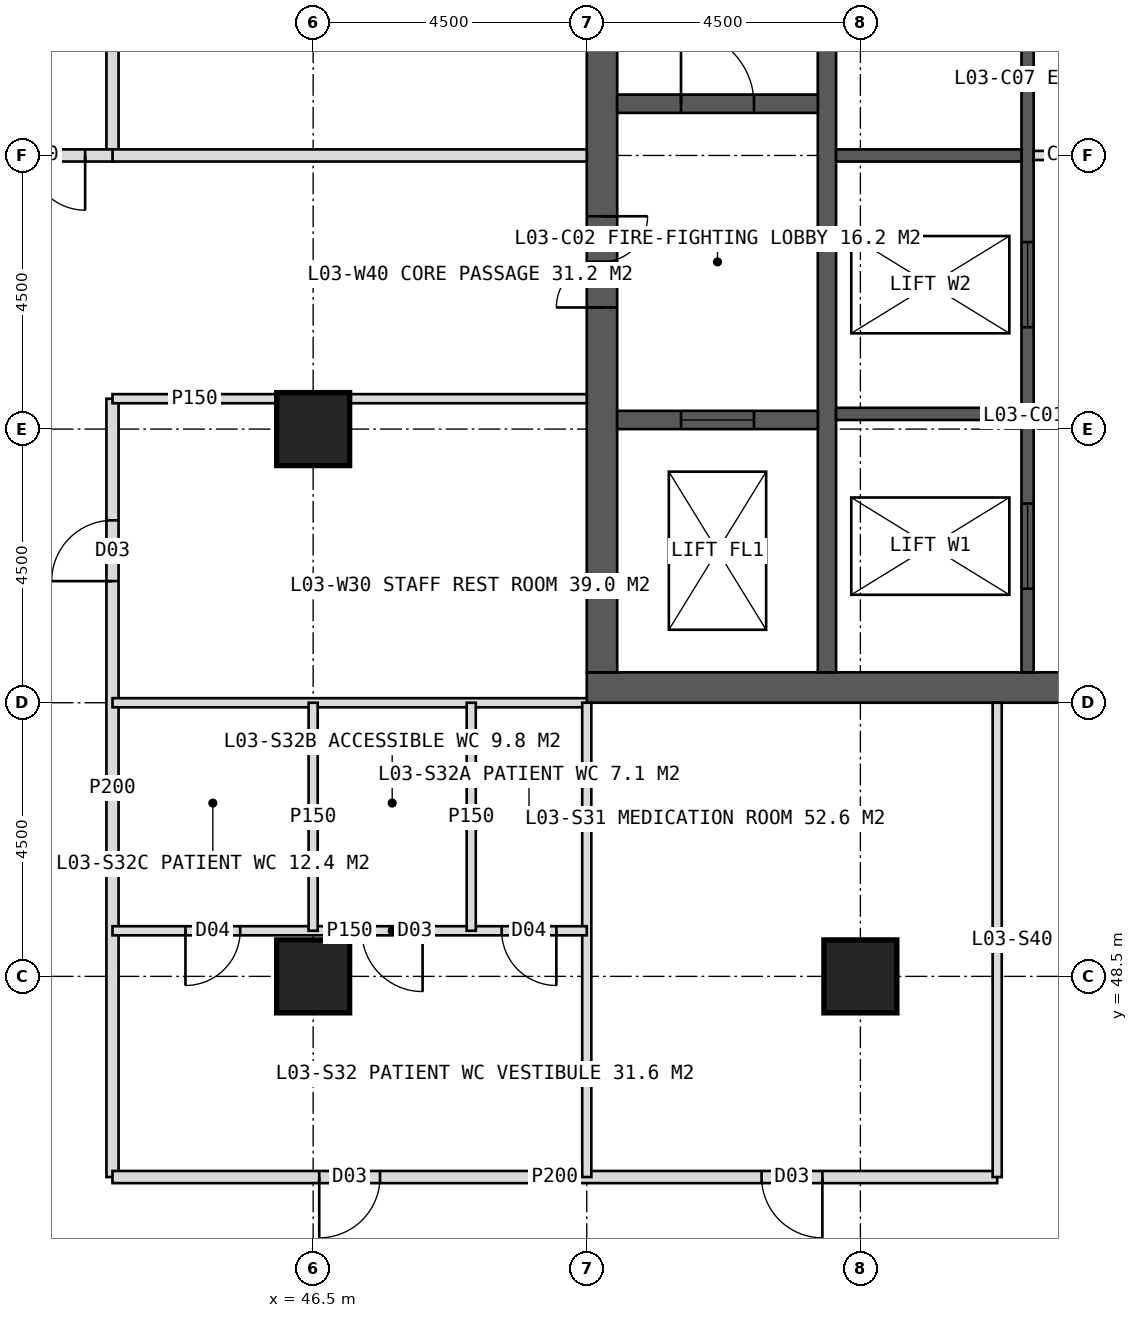
"""IFC4 building model, lengths in metres.
Left out: names, types, materials, properties, quantities, classifications, styles, units other than length and angle.
Written with IfcOpenShell. Run it as: python <this file> out.ifc"""

import sys

from ifc_helpers import new_model, si_unit, direction, frame, frame_2d, origin, origin_2d, place, context, subcontext, project, spatial, rectangle, hollow_rectangle, extrude, element, fill, save


model = new_model("IFC4")
c1 = context("Model", 3, precision=1e-05, world=origin(), true_north=direction((0.0, 1.0)))
c2 = subcontext(c1, "Body", "Model", "MODEL_VIEW")
j1 = project(units=[si_unit("LENGTHUNIT", "METRE"), si_unit("PLANEANGLEUNIT", "RADIAN")], contexts=[c1])
p1 = place(None, origin())
s1 = spatial("IfcSite", under=j1, at=p1, CompositionType="ELEMENT")
p2 = place(p1, origin())
s2 = spatial("IfcBuilding", under=s1, at=p2, CompositionType="ELEMENT")
p3 = place(p2, frame((0.0, 0.0, 16.5)))
s3 = spatial("IfcBuildingStorey", under=s2, at=p3, CompositionType="ELEMENT", Elevation=16.5)
p4 = place(p3, frame((51.0, 53.25, 0.0), z_axis=(0.0, 0.0, 1.0), x_axis=(1.0, 0.0, 0.0)))
e1 = element("IfcWall", 1, at=p4, inside=s3, PredefinedType="SHEAR", context=c2, shape_type="SweptSolid", body=[
    extrude(rectangle(XDim=18.0, YDim=0.5, at=frame_2d((9.0, 0.0))), origin(), (0.0, 0.0, 1.0), 4.5),
])
p5 = place(p4, frame((8.1, 0.0, 0.0)))
e2 = element("IfcOpeningElement", 2, at=p5, cuts=e1, PredefinedType="OPENING", context=c2, shape_type="SweptSolid", body=[
    extrude(rectangle(XDim=1.8, YDim=2.2, at=frame_2d((0.9, 1.1))), frame((0.0, 0.26, 0.0), z_axis=(0.0, -1.0, 0.0), x_axis=(1.0, 0.0, 0.0)), (0.0, 0.0, 1.0), 0.52),
])
p6 = place(p3, frame((51.25, 53.5, 0.0), z_axis=(0.0, 0.0, 1.0), x_axis=(0.0, 1.0, 0.0)))
e3 = element("IfcWall", 3, at=p6, inside=s3, PredefinedType="SHEAR", context=c2, shape_type="SweptSolid", body=[
    extrude(rectangle(XDim=17.0, YDim=0.5, at=frame_2d((8.5, 0.0))), origin(), (0.0, 0.0, 1.0), 4.5),
])
p7 = place(p6, frame((6.0, 0.0, 0.0)))
e4 = element("IfcOpeningElement", 4, at=p7, cuts=e3, PredefinedType="OPENING", context=c2, shape_type="SweptSolid", body=[
    extrude(rectangle(XDim=1.5, YDim=2.2, at=frame_2d((0.75, 1.1))), frame((0.0, 0.26, 0.0), z_axis=(0.0, -1.0, 0.0), x_axis=(1.0, 0.0, 0.0)), (0.0, 0.0, 1.0), 0.52),
])
p8 = place(p3, frame((54.95, 53.5, 0.0), z_axis=(0.0, 0.0, 1.0), x_axis=(0.0, 1.0, 0.0)))
e5 = element("IfcWall", 5, at=p8, inside=s3, PredefinedType="SHEAR", context=c2, shape_type="SweptSolid", body=[
    extrude(rectangle(XDim=17.0, YDim=0.3, at=frame_2d((8.5, 0.0))), origin(), (0.0, 0.0, 1.0), 4.5),
])
p9 = place(p3, frame((58.25, 53.5, 0.0), z_axis=(0.0, 0.0, 1.0), x_axis=(0.0, 1.0, 0.0)))
e6 = element("IfcWall", 6, at=p9, inside=s3, PredefinedType="SHEAR", context=c2, shape_type="SweptSolid", body=[
    extrude(rectangle(XDim=17.0, YDim=0.2, at=frame_2d((8.5, 0.0))), origin(), (0.0, 0.0, 1.0), 4.5),
])
p10 = place(p9, frame((1.375, 0.0, 0.0)))
e7 = element("IfcOpeningElement", 7, at=p10, cuts=e6, PredefinedType="OPENING", context=c2, shape_type="SweptSolid", body=[
    extrude(rectangle(XDim=1.4, YDim=2.2, at=frame_2d((0.7, 1.1))), frame((0.0, 0.11, 0.0), z_axis=(0.0, -1.0, 0.0), x_axis=(1.0, 0.0, 0.0)), (0.0, 0.0, 1.0), 0.22),
])
p11 = place(p9, frame((5.675, 0.0, 0.0)))
e8 = element("IfcOpeningElement", 8, at=p11, cuts=e6, PredefinedType="OPENING", context=c2, shape_type="SweptSolid", body=[
    extrude(rectangle(XDim=1.4, YDim=2.2, at=frame_2d((0.7, 1.1))), frame((0.0, 0.11, 0.0), z_axis=(0.0, -1.0, 0.0), x_axis=(1.0, 0.0, 0.0)), (0.0, 0.0, 1.0), 0.22),
])
for number, where, z_axis, x_axis in (
    (9, (55.1, 57.75, 0.0), (0.0, 0.0, 1.0), (1.0, 0.0, 0.0)),
    (10, (55.1, 62.0, 0.0), (0.0, 0.0, 1.0), (1.0, 0.0, 0.0)),
):
    element("IfcWall", number, at=place(p3, frame(where, z_axis=z_axis, x_axis=x_axis)), inside=s3, PredefinedType="SHEAR", context=c2, shape_type="SweptSolid", body=[
        extrude(rectangle(XDim=3.05, YDim=0.2, at=frame_2d((1.525, 0.0))), origin(), (0.0, 0.0, 1.0), 4.5),
    ])
p12 = place(p3, frame((51.5, 62.85, 0.0), z_axis=(0.0, 0.0, 1.0), x_axis=(1.0, 0.0, 0.0)))
e11 = element("IfcWall", 11, at=p12, inside=s3, PredefinedType="SHEAR", context=c2, shape_type="SweptSolid", body=[
    extrude(rectangle(XDim=3.3, YDim=0.3, at=frame_2d((1.65, 0.0))), origin(), (0.0, 0.0, 1.0), 4.5),
])
p13 = place(p12, frame((1.05, 0.0, 0.0)))
e12 = element("IfcOpeningElement", 12, at=p13, cuts=e11, PredefinedType="OPENING", context=c2, shape_type="SweptSolid", body=[
    extrude(rectangle(XDim=1.2, YDim=2.1, at=frame_2d((0.6, 1.05))), frame((0.0, 0.16, 0.0), z_axis=(0.0, -1.0, 0.0), x_axis=(1.0, 0.0, 0.0)), (0.0, 0.0, 1.0), 0.32),
])
p14 = place(p3, frame((51.5, 57.65, 0.0), z_axis=(0.0, 0.0, 1.0), x_axis=(1.0, 0.0, 0.0)))
e13 = element("IfcWall", 13, at=p14, inside=s3, PredefinedType="SHEAR", context=c2, shape_type="SweptSolid", body=[
    extrude(rectangle(XDim=3.3, YDim=0.3, at=frame_2d((1.65, 0.0))), origin(), (0.0, 0.0, 1.0), 4.5),
])
p15 = place(p14, frame((1.05, 0.0, 0.0)))
e14 = element("IfcOpeningElement", 14, at=p15, cuts=e13, PredefinedType="OPENING", context=c2, shape_type="SweptSolid", body=[
    extrude(rectangle(XDim=1.2, YDim=2.2, at=frame_2d((0.6, 1.1))), frame((0.0, 0.16, 0.0), z_axis=(0.0, -1.0, 0.0), x_axis=(1.0, 0.0, 0.0)), (0.0, 0.0, 1.0), 0.32),
])
for number, where, z_axis, x_axis in (
    (15, (46.5, 48.5, 0.0), (0.0, 0.0, 1.0), (1.0, 0.0, 0.0)),
    (16, (55.5, 48.5, 0.0), (0.0, 0.0, 1.0), (1.0, 0.0, 0.0)),
    (17, (46.5, 57.5, 0.0), (0.0, 0.0, 1.0), (1.0, 0.0, 0.0)),
):
    element("IfcColumn", number, at=place(p3, frame(where, z_axis=z_axis, x_axis=x_axis)), inside=s3, PredefinedType="COLUMN", context=c2, shape_type="SweptSolid", body=[
        extrude(hollow_rectangle(XDim=1.2, YDim=1.2, WallThickness=0.1, at=origin_2d()), origin(), (0.0, 0.0, 1.0), 4.5),
    ])
p16 = place(p3, frame((43.2, 45.2, 0.0), z_axis=(0.0, 0.0, 1.0), x_axis=(0.0, 1.0, 0.0)))
e18 = element("IfcWall", 18, at=p16, inside=s3, PredefinedType="PARTITIONING", context=c2, shape_type="SweptSolid", body=[
    extrude(rectangle(XDim=12.8, YDim=0.2, at=frame_2d((6.4, 0.0))), origin(), (0.0, 0.0, 1.0), 4.2),
])
p17 = place(p16, frame((9.8, 0.0, 0.0)))
e19 = element("IfcOpeningElement", 19, at=p17, cuts=e18, PredefinedType="OPENING", context=c2, shape_type="SweptSolid", body=[
    extrude(rectangle(XDim=1.0, YDim=2.1, at=frame_2d((0.5, 1.05))), frame((0.0, 0.11, 0.0), z_axis=(0.0, -1.0, 0.0), x_axis=(1.0, 0.0, 0.0)), (0.0, 0.0, 1.0), 0.22),
])
p18 = place(p3, frame((43.2, 62.0, 0.0), z_axis=(0.0, 0.0, 1.0), x_axis=(0.0, 1.0, 0.0)))
e20 = element("IfcWall", 20, at=p18, inside=s3, PredefinedType="PARTITIONING", context=c2, shape_type="SweptSolid", body=[
    extrude(rectangle(XDim=16.8, YDim=0.2, at=frame_2d((8.4, 0.0))), origin(), (0.0, 0.0, 1.0), 4.2),
])
p19 = place(p18, frame((4.0, 0.0, 0.0)))
e21 = element("IfcOpeningElement", 21, at=p19, cuts=e20, PredefinedType="OPENING", context=c2, shape_type="SweptSolid", body=[
    extrude(rectangle(XDim=1.0, YDim=2.1, at=frame_2d((0.5, 1.05))), frame((0.0, 0.11, 0.0), z_axis=(0.0, -1.0, 0.0), x_axis=(1.0, 0.0, 0.0)), (0.0, 0.0, 1.0), 0.22),
])
p20 = place(p18, frame((12.4, 0.0, 0.0)))
e22 = element("IfcOpeningElement", 22, at=p20, cuts=e20, PredefinedType="OPENING", context=c2, shape_type="SweptSolid", body=[
    extrude(rectangle(XDim=1.0, YDim=2.1, at=frame_2d((0.5, 1.05))), frame((0.0, 0.11, 0.0), z_axis=(0.0, -1.0, 0.0), x_axis=(1.0, 0.0, 0.0)), (0.0, 0.0, 1.0), 0.22),
])
p21 = place(p3, frame((51.0, 53.0, 0.0), z_axis=(0.0, 0.0, 1.0), x_axis=(-1.0, 0.0, 0.0)))
e23 = element("IfcWall", 23, at=p21, inside=s3, PredefinedType="PARTITIONING", context=c2, shape_type="SweptSolid", body=[
    extrude(rectangle(XDim=7.8, YDim=0.15, at=frame_2d((3.9, 0.0))), origin(), (0.0, 0.0, 1.0), 4.2),
])
p22 = place(p3, frame((51.0, 58.0, 0.0), z_axis=(0.0, 0.0, 1.0), x_axis=(-1.0, 0.0, 0.0)))
e24 = element("IfcWall", 24, at=p22, inside=s3, PredefinedType="PARTITIONING", context=c2, shape_type="SweptSolid", body=[
    extrude(rectangle(XDim=3.9, YDim=0.15, at=frame_2d((1.95, 0.0))), origin(), (0.0, 0.0, 1.0), 4.2),
])
p23 = place(p3, frame((45.9, 58.0, 0.0), z_axis=(0.0, 0.0, 1.0), x_axis=(-1.0, 0.0, 0.0)))
e25 = element("IfcWall", 25, at=p23, inside=s3, PredefinedType="PARTITIONING", context=c2, shape_type="SweptSolid", body=[
    extrude(rectangle(XDim=2.7, YDim=0.15, at=frame_2d((1.35, 0.0))), origin(), (0.0, 0.0, 1.0), 4.2),
])
p24 = place(p3, frame((51.0, 62.0, 0.0), z_axis=(0.0, 0.0, 1.0), x_axis=(-1.0, 0.0, 0.0)))
e26 = element("IfcWall", 26, at=p24, inside=s3, PredefinedType="SOLIDWALL", context=c2, shape_type="SweptSolid", body=[
    extrude(rectangle(XDim=7.8, YDim=0.2, at=frame_2d((3.9, 0.0))), origin(), (0.0, 0.0, 1.0), 3.4),
])
p25 = place(p3, frame((57.75, 45.2, 0.0), z_axis=(0.0, 0.0, 1.0), x_axis=(-1.0, 0.0, 0.0)))
e27 = element("IfcWall", 27, at=p25, inside=s3, PredefinedType="PARTITIONING", context=c2, shape_type="SweptSolid", body=[
    extrude(rectangle(XDim=14.55, YDim=0.2, at=frame_2d((7.275, 0.0))), origin(), (0.0, 0.0, 1.0), 4.2),
])
p26 = place(p25, frame((2.875, 0.0, 0.0)))
e28 = element("IfcOpeningElement", 28, at=p26, cuts=e27, PredefinedType="OPENING", context=c2, shape_type="SweptSolid", body=[
    extrude(rectangle(XDim=1.0, YDim=2.1, at=frame_2d((0.5, 1.05))), frame((0.0, 0.11, 0.0), z_axis=(0.0, -1.0, 0.0), x_axis=(1.0, 0.0, 0.0)), (0.0, 0.0, 1.0), 0.22),
])
p27 = place(p25, frame((10.15, 0.0, 0.0)))
e29 = element("IfcOpeningElement", 29, at=p27, cuts=e27, PredefinedType="OPENING", context=c2, shape_type="SweptSolid", body=[
    extrude(rectangle(XDim=1.0, YDim=2.1, at=frame_2d((0.5, 1.05))), frame((0.0, 0.11, 0.0), z_axis=(0.0, -1.0, 0.0), x_axis=(1.0, 0.0, 0.0)), (0.0, 0.0, 1.0), 0.22),
])
for number, where, z_axis, x_axis in (
    (30, (57.75, 53.0, 0.0), (0.0, 0.0, 1.0), (0.0, -1.0, 0.0)),
    (31, (51.0, 53.0, 0.0), (0.0, 0.0, 1.0), (0.0, -1.0, 0.0)),
):
    element("IfcWall", number, at=place(p3, frame(where, z_axis=z_axis, x_axis=x_axis)), inside=s3, PredefinedType="PARTITIONING", context=c2, shape_type="SweptSolid", body=[
        extrude(rectangle(XDim=7.8, YDim=0.15, at=frame_2d((3.9, 0.0))), origin(), (0.0, 0.0, 1.0), 4.2),
    ])
p28 = place(p3, frame((51.0, 49.25, 0.0), z_axis=(0.0, 0.0, 1.0), x_axis=(-1.0, 0.0, 0.0)))
e32 = element("IfcWall", 32, at=p28, inside=s3, PredefinedType="PARTITIONING", context=c2, shape_type="SweptSolid", body=[
    extrude(rectangle(XDim=7.8, YDim=0.15, at=frame_2d((3.9, 0.0))), origin(), (0.0, 0.0, 1.0), 4.2),
])
p29 = place(p28, frame((0.5, 0.0, 0.0)))
e33 = element("IfcOpeningElement", 33, at=p29, cuts=e32, PredefinedType="OPENING", context=c2, shape_type="SweptSolid", body=[
    extrude(rectangle(XDim=0.9, YDim=2.1, at=frame_2d((0.45, 1.05))), frame((0.0, 0.085, 0.0), z_axis=(0.0, -1.0, 0.0), x_axis=(1.0, 0.0, 0.0)), (0.0, 0.0, 1.0), 0.17),
])
p30 = place(p28, frame((2.7, 0.0, 0.0)))
e34 = element("IfcOpeningElement", 34, at=p30, cuts=e32, PredefinedType="OPENING", context=c2, shape_type="SweptSolid", body=[
    extrude(rectangle(XDim=1.0, YDim=2.1, at=frame_2d((0.5, 1.05))), frame((0.0, 0.085, 0.0), z_axis=(0.0, -1.0, 0.0), x_axis=(1.0, 0.0, 0.0)), (0.0, 0.0, 1.0), 0.17),
])
p31 = place(p28, frame((5.7, 0.0, 0.0)))
e35 = element("IfcOpeningElement", 35, at=p31, cuts=e32, PredefinedType="OPENING", context=c2, shape_type="SweptSolid", body=[
    extrude(rectangle(XDim=0.9, YDim=2.1, at=frame_2d((0.45, 1.05))), frame((0.0, 0.085, 0.0), z_axis=(0.0, -1.0, 0.0), x_axis=(1.0, 0.0, 0.0)), (0.0, 0.0, 1.0), 0.17),
])
p32 = place(p3, frame((49.1, 53.0, 0.0), z_axis=(0.0, 0.0, 1.0), x_axis=(0.0, -1.0, 0.0)))
e36 = element("IfcWall", 36, at=p32, inside=s3, PredefinedType="PARTITIONING", context=c2, shape_type="SweptSolid", body=[
    extrude(rectangle(XDim=3.75, YDim=0.15, at=frame_2d((1.875, 0.0))), origin(), (0.0, 0.0, 1.0), 4.2),
])
p33 = place(p3, frame((46.5, 53.0, 0.0), z_axis=(0.0, 0.0, 1.0), x_axis=(0.0, -1.0, 0.0)))
e37 = element("IfcWall", 37, at=p33, inside=s3, PredefinedType="PARTITIONING", context=c2, shape_type="SweptSolid", body=[
    extrude(rectangle(XDim=3.75, YDim=0.15, at=frame_2d((1.875, 0.0))), origin(), (0.0, 0.0, 1.0), 3.4),
])
p34 = place(p3, frame((43.2, 62.0, 0.0), z_axis=(0.0, 0.0, 1.0), x_axis=(-1.0, 0.0, 0.0)))
e38 = element("IfcWall", 38, at=p34, inside=s3, PredefinedType="SOLIDWALL", context=c2, shape_type="SweptSolid", body=[
    extrude(rectangle(XDim=2.7, YDim=0.2, at=frame_2d((1.35, 0.0))), origin(), (0.0, 0.0, 1.0), 3.4),
])
p35 = place(p34, frame((0.45, 0.0, 0.0)))
e39 = element("IfcOpeningElement", 39, at=p35, cuts=e38, PredefinedType="OPENING", context=c2, shape_type="SweptSolid", body=[
    extrude(rectangle(XDim=1.8, YDim=2.2, at=frame_2d((0.9, 1.1))), frame((0.0, 0.11, 0.0), z_axis=(0.0, -1.0, 0.0), x_axis=(1.0, 0.0, 0.0)), (0.0, 0.0, 1.0), 0.22),
])
p36 = place(p3, frame((58.35, 62.0, 0.0), z_axis=(0.0, 0.0, 1.0), x_axis=(1.0, 0.0, 0.0)))
e40 = element("IfcWall", 40, at=p36, inside=s3, PredefinedType="PARTITIONING", context=c2, shape_type="SweptSolid", body=[
    extrude(rectangle(XDim=3.3, YDim=0.15, at=frame_2d((1.65, 0.0))), origin(), (0.0, 0.0, 1.0), 4.2),
])
p37 = place(p36, frame((1.15, 0.0, 0.0)))
e41 = element("IfcOpeningElement", 41, at=p37, cuts=e40, PredefinedType="OPENING", context=c2, shape_type="SweptSolid", body=[
    extrude(rectangle(XDim=1.0, YDim=2.1, at=frame_2d((0.5, 1.05))), frame((0.0, 0.085, 0.0), z_axis=(0.0, -1.0, 0.0), x_axis=(1.0, 0.0, 0.0)), (0.0, 0.0, 1.0), 0.17),
])
p38 = place(p17, origin())
e42 = element("IfcDoor", 42, at=p38, inside=s3, OperationType="SINGLE_SWING_LEFT", PredefinedType="DOOR", context=c2, shape_type="SweptSolid", body=[
    extrude(rectangle(XDim=1.0, YDim=2.1, at=frame_2d((0.5, 1.05))), frame((0.0, 0.025, 0.0), z_axis=(0.0, -1.0, 0.0), x_axis=(1.0, 0.0, 0.0)), (0.0, 0.0, 1.0), 0.05),
])
fill(e19, e42)
p39 = place(p26, origin())
e43 = element("IfcDoor", 43, at=p39, inside=s3, OperationType="SINGLE_SWING_LEFT", PredefinedType="DOOR", context=c2, shape_type="SweptSolid", body=[
    extrude(rectangle(XDim=1.0, YDim=2.1, at=frame_2d((0.5, 1.05))), frame((0.0, 0.025, 0.0), z_axis=(0.0, -1.0, 0.0), x_axis=(1.0, 0.0, 0.0)), (0.0, 0.0, 1.0), 0.05),
])
fill(e28, e43)
p40 = place(p27, origin())
e44 = element("IfcDoor", 44, at=p40, inside=s3, OperationType="SINGLE_SWING_RIGHT", PredefinedType="DOOR", context=c2, shape_type="SweptSolid", body=[
    extrude(rectangle(XDim=1.0, YDim=2.1, at=frame_2d((0.5, 1.05))), frame((0.0, 0.025, 0.0), z_axis=(0.0, -1.0, 0.0), x_axis=(1.0, 0.0, 0.0)), (0.0, 0.0, 1.0), 0.05),
])
fill(e29, e44)
p41 = place(p35, origin())
e45 = element("IfcDoor", 45, at=p41, inside=s3, OperationType="DOUBLE_DOOR_DOUBLE_SWING", PredefinedType="DOOR", context=c2, shape_type="SweptSolid", body=[
    extrude(rectangle(XDim=1.8, YDim=2.2, at=frame_2d((0.9, 1.1))), frame((0.0, 0.025, 0.0), z_axis=(0.0, -1.0, 0.0), x_axis=(1.0, 0.0, 0.0)), (0.0, 0.0, 1.0), 0.05),
])
fill(e39, e45)
p42 = place(p7, origin())
e46 = element("IfcDoor", 46, at=p42, inside=s3, OperationType="DOUBLE_DOOR_SINGLE_SWING", PredefinedType="DOOR", context=c2, shape_type="SweptSolid", body=[
    extrude(rectangle(XDim=1.5, YDim=2.2, at=frame_2d((0.75, 1.1))), frame((0.0, 0.025, 0.0), z_axis=(0.0, -1.0, 0.0), x_axis=(1.0, 0.0, 0.0)), (0.0, 0.0, 1.0), 0.05),
])
fill(e4, e46)
p43 = place(p13, origin())
e47 = element("IfcDoor", 47, at=p43, inside=s3, OperationType="SINGLE_SWING_LEFT", PredefinedType="DOOR", context=c2, shape_type="SweptSolid", body=[
    extrude(rectangle(XDim=1.2, YDim=2.1, at=frame_2d((0.6, 1.05))), frame((0.0, 0.025, 0.0), z_axis=(0.0, -1.0, 0.0), x_axis=(1.0, 0.0, 0.0)), (0.0, 0.0, 1.0), 0.05),
])
fill(e12, e47)
p44 = place(p15, origin())
e48 = element("IfcDoor", 48, at=p44, inside=s3, OperationType="SLIDING_TO_LEFT", PredefinedType="DOOR", context=c2, shape_type="SweptSolid", body=[
    extrude(rectangle(XDim=1.2, YDim=2.2, at=frame_2d((0.6, 1.1))), frame((0.0, 0.025, 0.0), z_axis=(0.0, -1.0, 0.0), x_axis=(1.0, 0.0, 0.0)), (0.0, 0.0, 1.0), 0.05),
])
fill(e14, e48)
p45 = place(p10, origin())
e49 = element("IfcDoor", 49, at=p45, inside=s3, OperationType="SLIDING_TO_LEFT", PredefinedType="DOOR", context=c2, shape_type="SweptSolid", body=[
    extrude(rectangle(XDim=1.4, YDim=2.2, at=frame_2d((0.7, 1.1))), frame((0.0, 0.025, 0.0), z_axis=(0.0, -1.0, 0.0), x_axis=(1.0, 0.0, 0.0)), (0.0, 0.0, 1.0), 0.05),
])
fill(e7, e49)
p46 = place(p11, origin())
e50 = element("IfcDoor", 50, at=p46, inside=s3, OperationType="SLIDING_TO_LEFT", PredefinedType="DOOR", context=c2, shape_type="SweptSolid", body=[
    extrude(rectangle(XDim=1.4, YDim=2.2, at=frame_2d((0.7, 1.1))), frame((0.0, 0.025, 0.0), z_axis=(0.0, -1.0, 0.0), x_axis=(1.0, 0.0, 0.0)), (0.0, 0.0, 1.0), 0.05),
])
fill(e8, e50)
p47 = place(p29, origin())
e51 = element("IfcDoor", 51, at=p47, inside=s3, OperationType="SINGLE_SWING_LEFT", PredefinedType="DOOR", context=c2, shape_type="SweptSolid", body=[
    extrude(rectangle(XDim=0.9, YDim=2.1, at=frame_2d((0.45, 1.05))), frame((0.0, 0.025, 0.0), z_axis=(0.0, -1.0, 0.0), x_axis=(1.0, 0.0, 0.0)), (0.0, 0.0, 1.0), 0.05),
])
fill(e33, e51)
p48 = place(p30, origin())
e52 = element("IfcDoor", 52, at=p48, inside=s3, OperationType="SINGLE_SWING_LEFT", PredefinedType="DOOR", context=c2, shape_type="SweptSolid", body=[
    extrude(rectangle(XDim=1.0, YDim=2.1, at=frame_2d((0.5, 1.05))), frame((0.0, 0.025, 0.0), z_axis=(0.0, -1.0, 0.0), x_axis=(1.0, 0.0, 0.0)), (0.0, 0.0, 1.0), 0.05),
])
fill(e34, e52)
p49 = place(p31, origin())
e53 = element("IfcDoor", 53, at=p49, inside=s3, OperationType="SINGLE_SWING_RIGHT", PredefinedType="DOOR", context=c2, shape_type="SweptSolid", body=[
    extrude(rectangle(XDim=0.9, YDim=2.1, at=frame_2d((0.45, 1.05))), frame((0.0, 0.025, 0.0), z_axis=(0.0, -1.0, 0.0), x_axis=(1.0, 0.0, 0.0)), (0.0, 0.0, 1.0), 0.05),
])
fill(e35, e53)
save(model, sys.argv[1])
